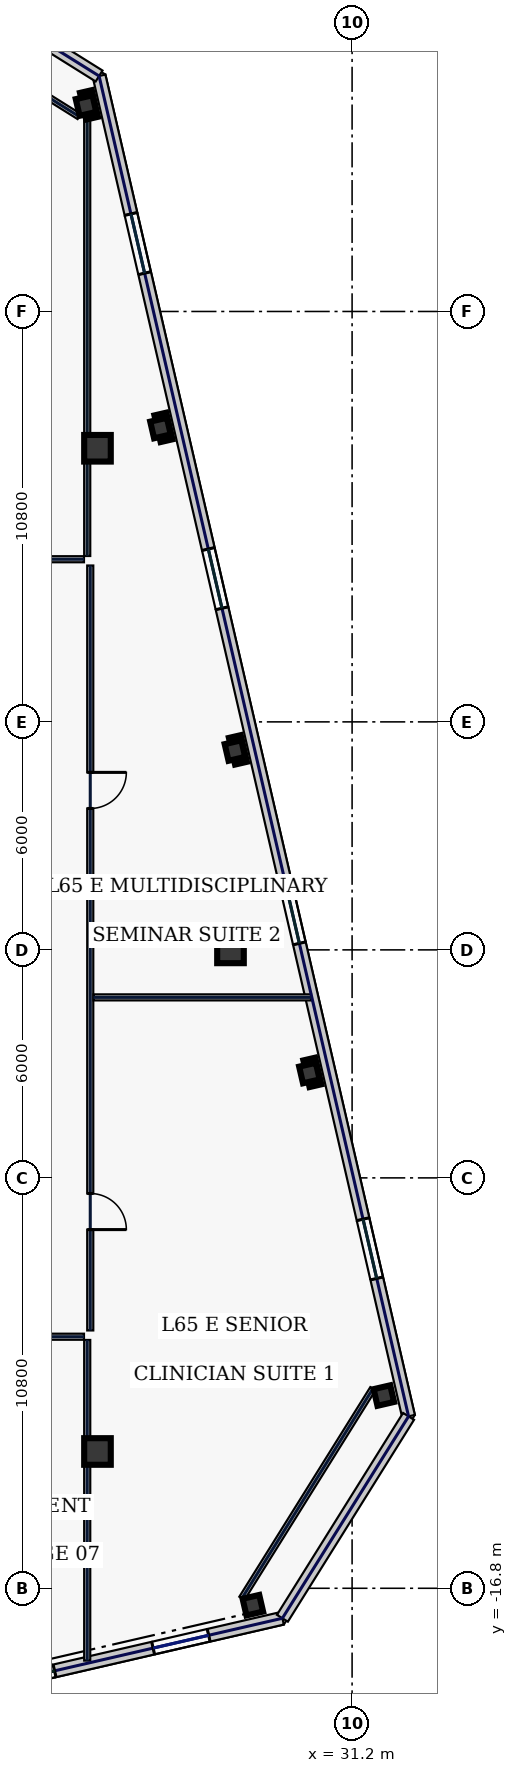
"""IFC4 building model, lengths in metres.
Left out: names, types, materials, properties, quantities, classifications, styles, units other than length and angle.
Written with IfcOpenShell. Run it as: python <this file> out.ifc"""

import sys

from ifc_helpers import new_model, si_unit, direction, frame, frame_2d, origin, origin_2d, place, context, subcontext, project, spatial, rectangle, hollow_rectangle, extrude, element, fill, save


model = new_model("IFC4")
c1 = context("Model", 3, precision=1e-05, world=origin(), true_north=direction((0.0, 1.0)))
c2 = subcontext(c1, "Body", "Model", "MODEL_VIEW")
j1 = project(units=[si_unit("LENGTHUNIT", "METRE"), si_unit("PLANEANGLEUNIT", "RADIAN")], contexts=[c1])
p1 = place(None, origin())
s1 = spatial("IfcSite", under=j1, at=p1, CompositionType="ELEMENT")
p2 = place(p1, origin())
s2 = spatial("IfcBuilding", under=s1, at=p2, CompositionType="ELEMENT")
p3 = place(p2, frame((0.0, 0.0, 281.0)))
s3 = spatial("IfcBuildingStorey", under=s2, at=p3, CompositionType="ELEMENT", Elevation=281.0)
for number, where, z_axis, x_axis in (
    (1, (24.5, -13.2, 0.0), (0.0, 0.0, 1.0), (1.0, 0.0, 0.0)),
    (2, (24.5, 13.2, 0.0), (0.0, 0.0, 1.0), (1.0, 0.0, 0.0)),
    (3, (28.0, 0.0, 0.0), (0.0, 0.0, 1.0), (1.0, 0.0, 0.0)),
):
    element("IfcColumn", number, at=place(p3, frame(where, z_axis=z_axis, x_axis=x_axis)), inside=s3, PredefinedType="COLUMN", context=c2, shape_type="SweptSolid", body=[
        extrude(hollow_rectangle(XDim=0.7, YDim=0.7, WallThickness=0.032, at=origin_2d()), origin(), (0.0, 0.0, 1.0), 3.74),
    ])
for number, where, z_axis, x_axis in (
    (4, (28.589, -17.245, 0.0), (0.0, 0.0, 1.0), (0.974, 0.225, 0.0)),
    (5, (32.036, -11.728, 0.0), (0.0, 0.0, 1.0), (0.974, 0.225, 0.0)),
    (6, (30.077, -3.241, 0.0), (0.0, 0.0, 1.0), (0.974, 0.225, 0.0)),
    (7, (28.117, 5.246, 0.0), (0.0, 0.0, 1.0), (0.974, 0.225, 0.0)),
    (8, (26.158, 13.732, 0.0), (0.0, 0.0, 1.0), (0.974, 0.225, 0.0)),
    (9, (24.198, 22.219, 0.0), (0.0, 0.0, 1.0), (0.974, 0.225, 0.0)),
):
    element("IfcColumn", number, at=place(p3, frame(where, z_axis=z_axis, x_axis=x_axis)), inside=s3, PredefinedType="COLUMN", context=c2, shape_type="SweptSolid", body=[
        extrude(hollow_rectangle(XDim=0.45, YDim=0.45, WallThickness=0.022, at=origin_2d()), origin(), (0.0, 0.0, 1.0), 3.74),
    ])
p4 = place(p3, frame((12.445, -21.495, 0.0), z_axis=(0.0, 0.0, 1.0), x_axis=(0.974369392164, 0.224953967767, 0.0)))
e10 = element("IfcWall", 10, at=p4, inside=s3, PredefinedType="STANDARD", context=c2, shape_type="SweptSolid", body=[
    extrude(rectangle(XDim=17.366, YDim=0.34, at=frame_2d((8.683, 0.0))), origin(), (0.0, 0.0, 1.0), 3.74),
])
p5 = place(p4, frame((2.729, 0.0, 0.9)))
e11 = element("IfcOpeningElement", 11, at=p5, cuts=e10, PredefinedType="OPENING", context=c2, shape_type="SweptSolid", body=[
    extrude(rectangle(XDim=1.5, YDim=2.0, at=frame_2d((0.75, 1.0))), frame((0.0, 0.18, 0.0), z_axis=(0.0, -1.0, 0.0), x_axis=(1.0, 0.0, 0.0)), (0.0, 0.0, 1.0), 0.36),
])
p6 = place(p4, frame((10.363, 0.0, 0.9)))
e12 = element("IfcOpeningElement", 12, at=p6, cuts=e10, PredefinedType="OPENING", context=c2, shape_type="SweptSolid", body=[
    extrude(rectangle(XDim=0.85, YDim=1.85, at=frame_2d((0.425, 0.925))), frame((0.0, 0.18, 0.0), z_axis=(0.0, -1.0, 0.0), x_axis=(1.0, 0.0, 0.0)), (0.0, 0.0, 1.0), 0.36),
])
p7 = place(p4, frame((13.875, 0.0, 0.9)))
e13 = element("IfcOpeningElement", 13, at=p7, cuts=e10, PredefinedType="OPENING", context=c2, shape_type="SweptSolid", body=[
    extrude(rectangle(XDim=1.5, YDim=2.0, at=frame_2d((0.75, 1.0))), frame((0.0, 0.18, 0.0), z_axis=(0.0, -1.0, 0.0), x_axis=(1.0, 0.0, 0.0)), (0.0, 0.0, 1.0), 0.36),
])
p8 = place(p3, frame((32.686, -12.276, 0.0), z_axis=(0.0, 0.0, 1.0), x_axis=(-0.224953091034, 0.974369594576, 0.0)))
e14 = element("IfcWall", 14, at=p8, inside=s3, PredefinedType="STANDARD", context=c2, shape_type="SweptSolid", body=[
    extrude(rectangle(XDim=36.2, YDim=0.34, at=frame_2d((18.1, 0.0))), origin(), (0.0, 0.0, 1.0), 3.74),
])
p9 = place(p8, frame((3.725, 0.0, 0.58)))
e15 = element("IfcOpeningElement", 15, at=p9, cuts=e14, PredefinedType="OPENING", context=c2, shape_type="SweptSolid", body=[
    extrude(rectangle(XDim=1.6, YDim=2.3, at=frame_2d((0.8, 1.15))), frame((0.0, 0.18, 0.0), z_axis=(0.0, -1.0, 0.0), x_axis=(1.0, 0.0, 0.0)), (0.0, 0.0, 1.0), 0.36),
])
p10 = place(p8, frame((12.775, 0.0, 0.58)))
e16 = element("IfcOpeningElement", 16, at=p10, cuts=e14, PredefinedType="OPENING", context=c2, shape_type="SweptSolid", body=[
    extrude(rectangle(XDim=1.6, YDim=2.3, at=frame_2d((0.8, 1.15))), frame((0.0, 0.18, 0.0), z_axis=(0.0, -1.0, 0.0), x_axis=(1.0, 0.0, 0.0)), (0.0, 0.0, 1.0), 0.36),
])
p11 = place(p8, frame((21.825, 0.0, 0.58)))
e17 = element("IfcOpeningElement", 17, at=p11, cuts=e14, PredefinedType="OPENING", context=c2, shape_type="SweptSolid", body=[
    extrude(rectangle(XDim=1.6, YDim=2.3, at=frame_2d((0.8, 1.15))), frame((0.0, 0.18, 0.0), z_axis=(0.0, -1.0, 0.0), x_axis=(1.0, 0.0, 0.0)), (0.0, 0.0, 1.0), 0.36),
])
p12 = place(p8, frame((30.875, 0.0, 0.22)))
e18 = element("IfcOpeningElement", 18, at=p12, cuts=e14, PredefinedType="OPENING", context=c2, shape_type="SweptSolid", body=[
    extrude(rectangle(XDim=1.6, YDim=1.2, at=frame_2d((0.8, 0.6))), frame((0.0, 0.18, 0.0), z_axis=(0.0, -1.0, 0.0), x_axis=(1.0, 0.0, 0.0)), (0.0, 0.0, 1.0), 0.36),
])
for number, where, z_axis, x_axis in (
    (19, (29.366, -17.589, 0.0), (0.0, 0.0, 1.0), (0.53, 0.848, 0.0)),
    (20, (24.542, 22.996, 0.0), (0.0, 0.0, 1.0), (-0.848, 0.53, 0.0)),
):
    element("IfcWall", number, at=place(p3, frame(where, z_axis=z_axis, x_axis=x_axis)), inside=s3, PredefinedType="STANDARD", context=c2, shape_type="SweptSolid", body=[
        extrude(rectangle(XDim=6.265, YDim=0.34, at=frame_2d((3.132, 0.0))), origin(), (0.0, 0.0, 1.0), 3.74),
    ])
for number, where, z_axis, x_axis in (
    (21, (28.3, -17.065, 0.0), (0.0, 0.0, 1.0), (0.53, 0.848, 0.0)),
    (22, (24.018, 21.931, 0.0), (0.0, 0.0, 1.0), (-0.848, 0.53, 0.0)),
):
    element("IfcWall", number, at=place(p3, frame(where, z_axis=z_axis, x_axis=x_axis)), inside=s3, PredefinedType="PARTITIONING", context=c2, shape_type="SweptSolid", body=[
        extrude(rectangle(XDim=6.505, YDim=0.16, at=frame_2d((3.253, 0.0))), origin(), (0.0, 0.0, 1.0), 3.74),
    ])
p13 = place(p3, frame((-24.145, 10.28, 0.0), z_axis=(0.0, 0.0, 1.0), x_axis=(1.0, 0.0, 0.0)))
e23 = element("IfcWall", 23, at=p13, inside=s3, PredefinedType="PARTITIONING", context=c2, shape_type="SweptSolid", body=[
    extrude(rectangle(XDim=48.29, YDim=0.16, at=frame_2d((24.145, 0.0))), origin(), (0.0, 0.0, 1.0), 3.74),
])
p14 = place(p13, frame((5.534, 0.0, 0.0)))
e24 = element("IfcOpeningElement", 24, at=p14, cuts=e23, PredefinedType="OPENING", context=c2, shape_type="SweptSolid", body=[
    extrude(rectangle(XDim=0.95, YDim=2.2, at=frame_2d((0.475, 1.1))), frame((0.0, 0.09, 0.0), z_axis=(0.0, -1.0, 0.0), x_axis=(1.0, 0.0, 0.0)), (0.0, 0.0, 1.0), 0.18),
])
p15 = place(p13, frame((17.83, 0.0, 0.0)))
e25 = element("IfcOpeningElement", 25, at=p15, cuts=e23, PredefinedType="OPENING", context=c2, shape_type="SweptSolid", body=[
    extrude(rectangle(XDim=1.15, YDim=2.2, at=frame_2d((0.575, 1.1))), frame((0.0, 0.09, 0.0), z_axis=(0.0, -1.0, 0.0), x_axis=(1.0, 0.0, 0.0)), (0.0, 0.0, 1.0), 0.18),
])
p16 = place(p13, frame((30.73, 0.0, 0.0)))
e26 = element("IfcOpeningElement", 26, at=p16, cuts=e23, PredefinedType="OPENING", context=c2, shape_type="SweptSolid", body=[
    extrude(rectangle(XDim=0.95, YDim=2.2, at=frame_2d((0.475, 1.1))), frame((0.0, 0.09, 0.0), z_axis=(0.0, -1.0, 0.0), x_axis=(1.0, 0.0, 0.0)), (0.0, 0.0, 1.0), 0.18),
])
p17 = place(p13, frame((39.938, 0.0, 0.0)))
e27 = element("IfcOpeningElement", 27, at=p17, cuts=e23, PredefinedType="OPENING", context=c2, shape_type="SweptSolid", body=[
    extrude(rectangle(XDim=0.95, YDim=2.2, at=frame_2d((0.475, 1.1))), frame((0.0, 0.09, 0.0), z_axis=(0.0, -1.0, 0.0), x_axis=(1.0, 0.0, 0.0)), (0.0, 0.0, 1.0), 0.18),
])
p18 = place(p13, frame((45.258, 0.0, 0.0)))
e28 = element("IfcOpeningElement", 28, at=p18, cuts=e23, PredefinedType="OPENING", context=c2, shape_type="SweptSolid", body=[
    extrude(rectangle(XDim=1.05, YDim=2.2, at=frame_2d((0.525, 1.1))), frame((0.0, 0.09, 0.0), z_axis=(0.0, -1.0, 0.0), x_axis=(1.0, 0.0, 0.0)), (0.0, 0.0, 1.0), 0.18),
])
p19 = place(p3, frame((24.31, 10.115, 0.0), z_axis=(0.0, 0.0, 1.0), x_axis=(0.0, -1.0, 0.0)))
e29 = element("IfcWall", 29, at=p19, inside=s3, PredefinedType="PARTITIONING", context=c2, shape_type="SweptSolid", body=[
    extrude(rectangle(XDim=20.13, YDim=0.16, at=frame_2d((10.065, 0.0))), origin(), (0.0, 0.0, 1.0), 3.74),
])
p20 = place(p19, frame((16.526, 0.0, 0.0)))
e30 = element("IfcOpeningElement", 30, at=p20, cuts=e29, PredefinedType="OPENING", context=c2, shape_type="SweptSolid", body=[
    extrude(rectangle(XDim=0.95, YDim=2.2, at=frame_2d((0.475, 1.1))), frame((0.0, 0.09, 0.0), z_axis=(0.0, -1.0, 0.0), x_axis=(1.0, 0.0, 0.0)), (0.0, 0.0, 1.0), 0.18),
])
p21 = place(p19, frame((5.444, 0.0, 0.0)))
e31 = element("IfcOpeningElement", 31, at=p21, cuts=e29, PredefinedType="OPENING", context=c2, shape_type="SweptSolid", body=[
    extrude(rectangle(XDim=0.95, YDim=2.2, at=frame_2d((0.475, 1.1))), frame((0.0, 0.09, 0.0), z_axis=(0.0, -1.0, 0.0), x_axis=(1.0, 0.0, 0.0)), (0.0, 0.0, 1.0), 0.18),
])
p22 = place(p3, frame((24.145, -10.18, 0.0), z_axis=(0.0, 0.0, 1.0), x_axis=(-1.0, 0.0, 0.0)))
e32 = element("IfcWall", 32, at=p22, inside=s3, PredefinedType="PARTITIONING", context=c2, shape_type="SweptSolid", body=[
    extrude(rectangle(XDim=9.08, YDim=0.16, at=frame_2d((4.54, 0.0))), origin(), (0.0, 0.0, 1.0), 3.74),
])
p23 = place(p22, frame((2.434, 0.0, 0.0)))
e33 = element("IfcOpeningElement", 33, at=p23, cuts=e32, PredefinedType="OPENING", context=c2, shape_type="SweptSolid", body=[
    extrude(rectangle(XDim=0.95, YDim=2.2, at=frame_2d((0.475, 1.1))), frame((0.0, 0.09, 0.0), z_axis=(0.0, -1.0, 0.0), x_axis=(1.0, 0.0, 0.0)), (0.0, 0.0, 1.0), 0.18),
])
p24 = place(p3, frame((24.23, 10.365, 0.0), z_axis=(0.0, 0.0, 1.0), x_axis=(0.0, 1.0, 0.0)))
e34 = element("IfcWall", 34, at=p24, inside=s3, PredefinedType="PARTITIONING", context=c2, shape_type="SweptSolid", body=[
    extrude(rectangle(XDim=12.206, YDim=0.16, at=frame_2d((6.103, 0.0))), origin(), (0.0, 0.0, 1.0), 2.135),
])
p25 = place(p3, frame((24.23, -18.703, 0.0), z_axis=(0.0, 0.0, 1.0), x_axis=(0.0, 1.0, 0.0)))
e35 = element("IfcWall", 35, at=p25, inside=s3, PredefinedType="PARTITIONING", context=c2, shape_type="SweptSolid", body=[
    extrude(rectangle(XDim=8.438, YDim=0.16, at=frame_2d((4.219, 0.0))), origin(), (0.0, 0.0, 1.0), 3.74),
])
p26 = place(p3, frame((24.395, -1.25, 0.0), z_axis=(0.0, 0.0, 1.0), x_axis=(1.0, 0.0, 0.0)))
e36 = element("IfcWall", 36, at=p26, inside=s3, PredefinedType="PARTITIONING", context=c2, shape_type="SweptSolid", body=[
    extrude(rectangle(XDim=5.725, YDim=0.16, at=frame_2d((2.862, 0.0))), origin(), (0.0, 0.0, 1.0), 3.74),
])
p27 = place(p6, origin())
e37 = element("IfcWindow", 37, at=p27, inside=s3, PartitioningType="SINGLE_PANEL", PredefinedType="WINDOW", context=c2, shape_type="SweptSolid", body=[
    extrude(rectangle(XDim=0.85, YDim=1.85, at=frame_2d((0.425, 0.925))), frame((0.0, 0.03, 0.0), z_axis=(0.0, -1.0, 0.0), x_axis=(1.0, 0.0, 0.0)), (0.0, 0.0, 1.0), 0.06),
])
fill(e12, e37)
p28 = place(p7, origin())
e38 = element("IfcWindow", 38, at=p28, inside=s3, PartitioningType="SINGLE_PANEL", PredefinedType="WINDOW", context=c2, shape_type="SweptSolid", body=[
    extrude(rectangle(XDim=1.5, YDim=2.0, at=frame_2d((0.75, 1.0))), frame((0.0, 0.03, 0.0), z_axis=(0.0, -1.0, 0.0), x_axis=(1.0, 0.0, 0.0)), (0.0, 0.0, 1.0), 0.06),
])
fill(e13, e38)
p29 = place(p9, origin())
e39 = element("IfcWindow", 39, at=p29, inside=s3, PartitioningType="SINGLE_PANEL", PredefinedType="WINDOW", context=c2, shape_type="SweptSolid", body=[
    extrude(rectangle(XDim=1.6, YDim=2.3, at=frame_2d((0.8, 1.15))), frame((0.0, 0.03, 0.0), z_axis=(0.0, -1.0, 0.0), x_axis=(1.0, 0.0, 0.0)), (0.0, 0.0, 1.0), 0.06),
])
fill(e15, e39)
p30 = place(p10, origin())
e40 = element("IfcWindow", 40, at=p30, inside=s3, PartitioningType="SINGLE_PANEL", PredefinedType="WINDOW", context=c2, shape_type="SweptSolid", body=[
    extrude(rectangle(XDim=1.6, YDim=2.3, at=frame_2d((0.8, 1.15))), frame((0.0, 0.03, 0.0), z_axis=(0.0, -1.0, 0.0), x_axis=(1.0, 0.0, 0.0)), (0.0, 0.0, 1.0), 0.06),
])
fill(e16, e40)
p31 = place(p11, origin())
e41 = element("IfcWindow", 41, at=p31, inside=s3, PartitioningType="SINGLE_PANEL", PredefinedType="WINDOW", context=c2, shape_type="SweptSolid", body=[
    extrude(rectangle(XDim=1.6, YDim=2.3, at=frame_2d((0.8, 1.15))), frame((0.0, 0.03, 0.0), z_axis=(0.0, -1.0, 0.0), x_axis=(1.0, 0.0, 0.0)), (0.0, 0.0, 1.0), 0.06),
])
fill(e17, e41)
p32 = place(p12, origin())
e42 = element("IfcWindow", 42, at=p32, inside=s3, PartitioningType="SINGLE_PANEL", PredefinedType="WINDOW", context=c2, shape_type="SweptSolid", body=[
    extrude(rectangle(XDim=1.6, YDim=1.2, at=frame_2d((0.8, 0.6))), frame((0.0, 0.03, 0.0), z_axis=(0.0, -1.0, 0.0), x_axis=(1.0, 0.0, 0.0)), (0.0, 0.0, 1.0), 0.06),
])
fill(e18, e42)
p33 = place(p20, origin())
e43 = element("IfcDoor", 43, at=p33, inside=s3, OperationType="SINGLE_SWING_RIGHT", PredefinedType="DOOR", context=c2, shape_type="SweptSolid", body=[
    extrude(rectangle(XDim=0.95, YDim=2.2, at=frame_2d((0.475, 1.1))), frame((0.0, 0.025, 0.0), z_axis=(0.0, -1.0, 0.0), x_axis=(1.0, 0.0, 0.0)), (0.0, 0.0, 1.0), 0.05),
])
fill(e30, e43)
p34 = place(p21, origin())
e44 = element("IfcDoor", 44, at=p34, inside=s3, OperationType="SINGLE_SWING_LEFT", PredefinedType="DOOR", context=c2, shape_type="SweptSolid", body=[
    extrude(rectangle(XDim=0.95, YDim=2.2, at=frame_2d((0.475, 1.1))), frame((0.0, 0.025, 0.0), z_axis=(0.0, -1.0, 0.0), x_axis=(1.0, 0.0, 0.0)), (0.0, 0.0, 1.0), 0.05),
])
fill(e31, e44)
save(model, sys.argv[1])
